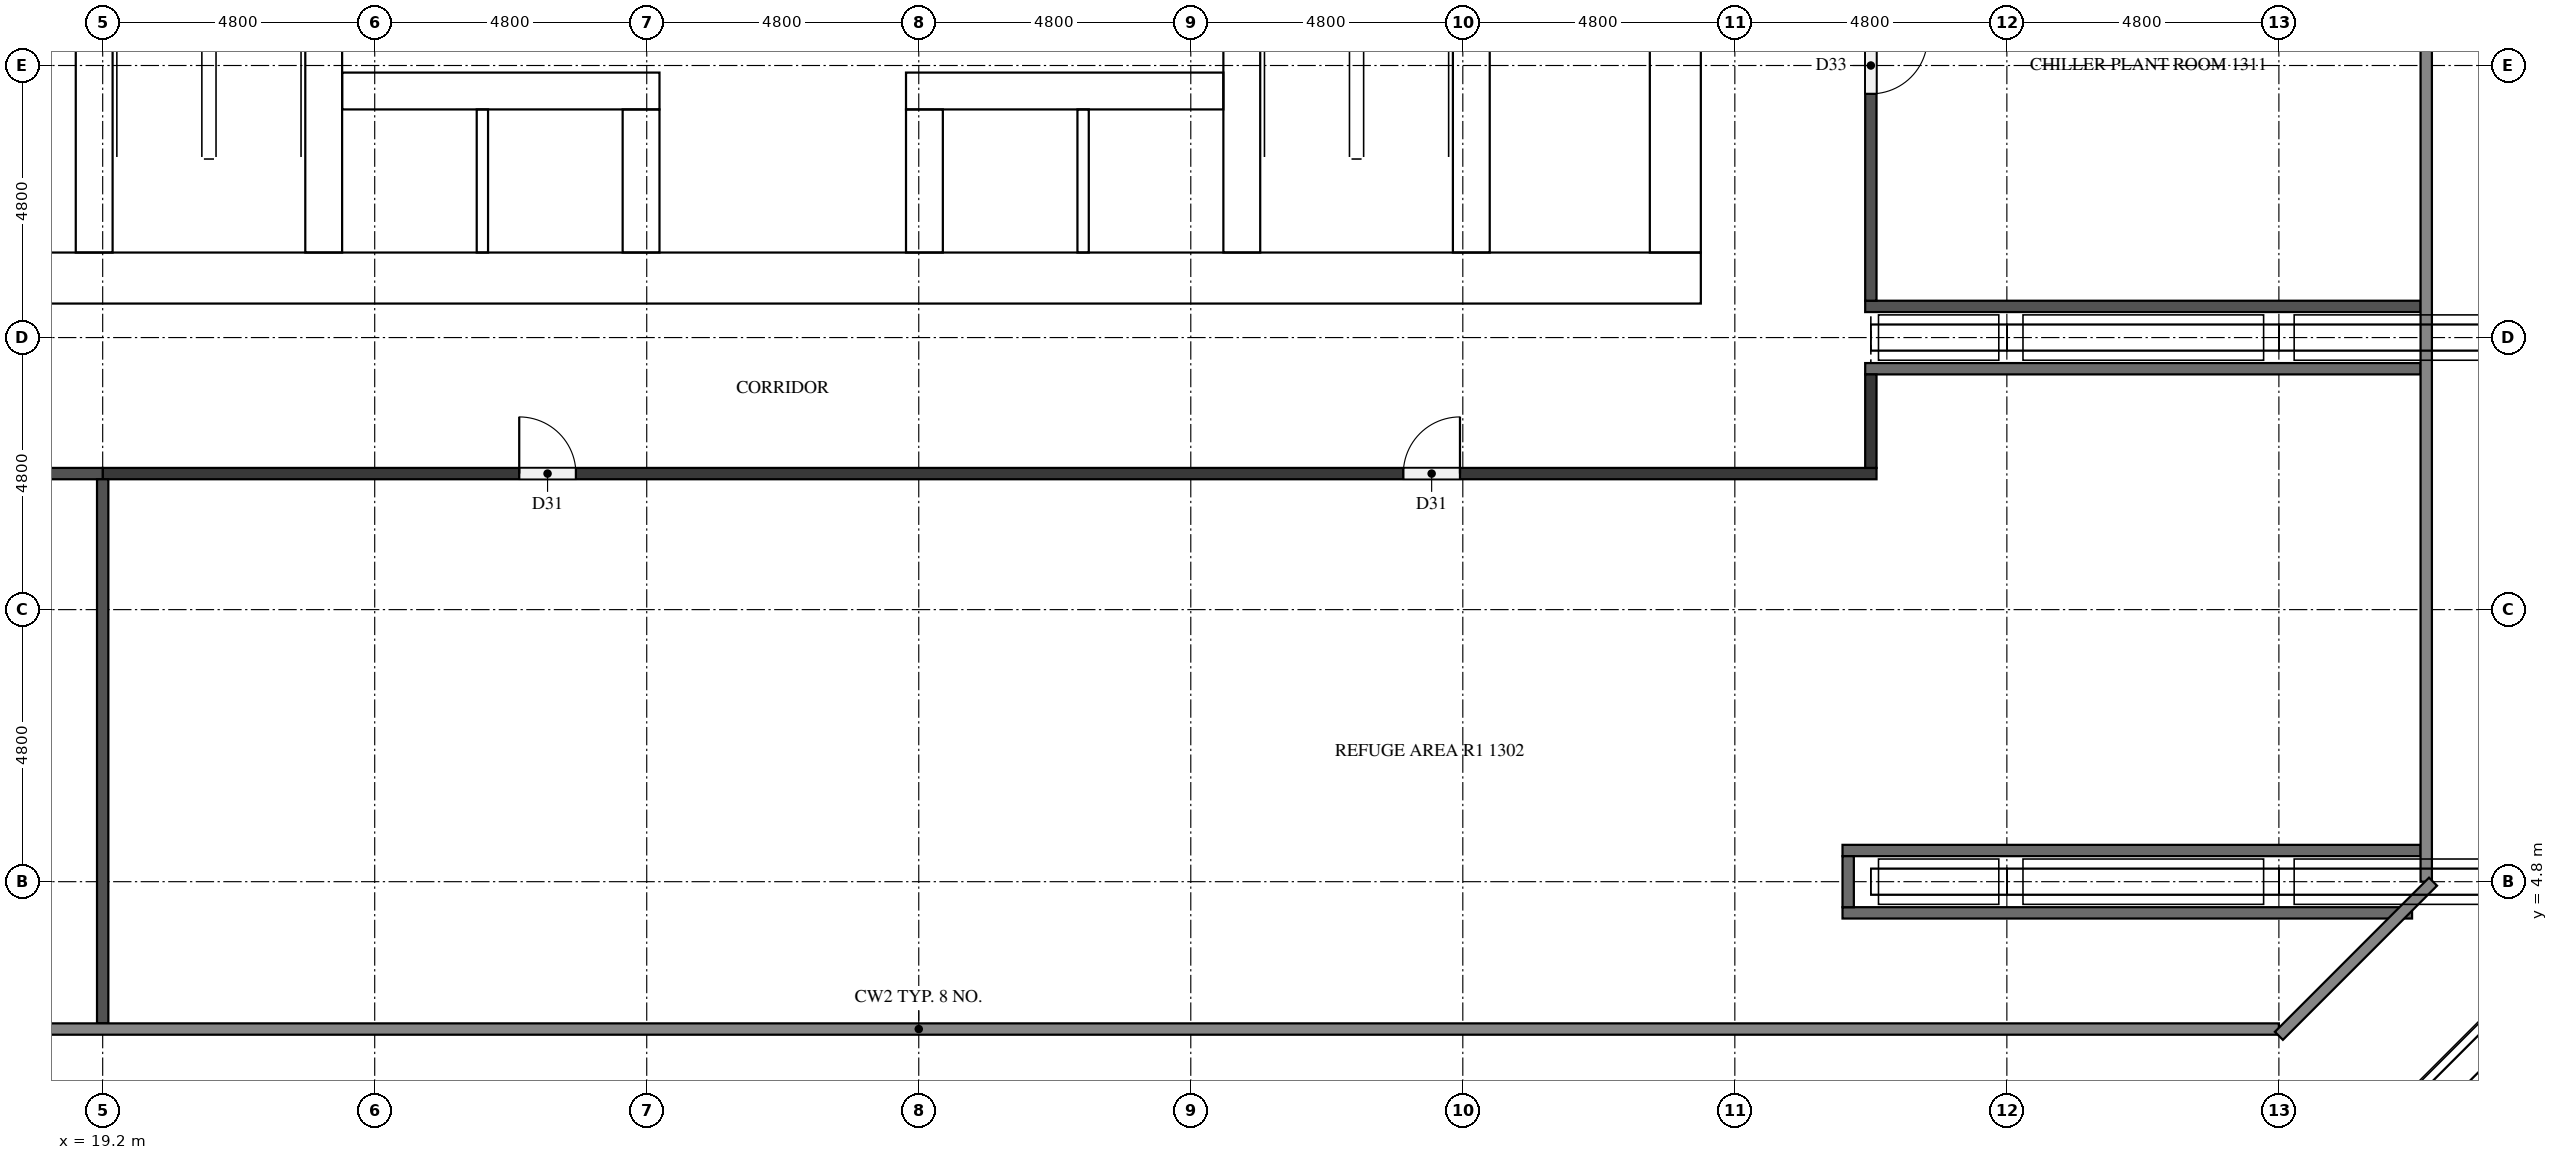
"""IFC4 building model, lengths in metres.
Left out: names, types, materials, properties, quantities, classifications, styles, units other than length and angle.
Written with IfcOpenShell. Run it as: python <this file> out.ifc"""

import sys

from ifc_helpers import new_model, si_unit, direction, frame, frame_2d, origin, place, context, subcontext, project, spatial, rectangle, extrude, element, fill, save


model = new_model("IFC4")
c1 = context("Model", 3, precision=1e-05, world=origin(), true_north=direction((0.0, 1.0)))
c2 = subcontext(c1, "Body", "Model", "MODEL_VIEW")
j1 = project(units=[si_unit("LENGTHUNIT", "METRE"), si_unit("PLANEANGLEUNIT", "RADIAN")], contexts=[c1])
p1 = place(None, origin())
s1 = spatial("IfcSite", under=j1, at=p1, CompositionType="ELEMENT")
p2 = place(p1, origin())
s2 = spatial("IfcBuilding", under=s1, at=p2, CompositionType="ELEMENT")
p3 = place(p2, frame((0.0, 0.0, 53.9)))
s3 = spatial("IfcBuildingStorey", under=s2, at=p3, CompositionType="ELEMENT", Elevation=53.9)
p4 = place(p3, frame((15.0, 15.45, 0.0), z_axis=(0.0, 0.0, 1.0), x_axis=(1.0, 0.0, 0.0)))
e1 = element("IfcWall", 1, at=p4, inside=s3, PredefinedType="SHEAR", context=c2, shape_type="SweptSolid", body=[
    extrude(rectangle(XDim=32.4, YDim=0.9, at=frame_2d((16.2, 0.0))), origin(), (0.0, 0.0, 1.0), 5.1),
])
p5 = place(p4, frame((15.3, 0.0, 0.0)))
e2 = element("IfcOpeningElement", 2, at=p5, cuts=e1, PredefinedType="OPENING", context=c2, shape_type="SweptSolid", body=[
    extrude(rectangle(XDim=1.8, YDim=2.1, at=frame_2d((0.9, 1.05))), frame((0.0, 0.46, 0.0), z_axis=(0.0, -1.0, 0.0), x_axis=(1.0, 0.0, 0.0)), (0.0, 0.0, 1.0), 0.92),
])
p6 = place(p3, frame((46.95, 15.9, 0.0), z_axis=(0.0, 0.0, 1.0), x_axis=(0.0, 1.0, 0.0)))
e3 = element("IfcWall", 3, at=p6, inside=s3, PredefinedType="SHEAR", context=c2, shape_type="SweptSolid", body=[
    extrude(rectangle(XDim=21.0, YDim=0.9, at=frame_2d((10.5, 0.0))), origin(), (0.0, 0.0, 1.0), 5.1),
])
p7 = place(p6, frame((10.2, 0.0, 0.0)))
e4 = element("IfcOpeningElement", 4, at=p7, cuts=e3, PredefinedType="OPENING", context=c2, shape_type="SweptSolid", body=[
    extrude(rectangle(XDim=1.2, YDim=2.1, at=frame_2d((0.6, 1.05))), frame((0.0, 0.46, 0.0), z_axis=(0.0, -1.0, 0.0), x_axis=(1.0, 0.0, 0.0)), (0.0, 0.0, 1.0), 0.92),
])
p8 = place(p3, frame((19.05, 15.9, 0.0), z_axis=(0.0, 0.0, 1.0), x_axis=(0.0, 1.0, 0.0)))
e5 = element("IfcWall", 5, at=p8, inside=s3, PredefinedType="SHEAR", context=c2, shape_type="SweptSolid", body=[
    extrude(rectangle(XDim=15.025, YDim=0.65, at=frame_2d((7.513, 0.0))), origin(), (0.0, 0.0, 1.0), 5.1),
])
p9 = place(p8, frame((9.55, 0.0, 0.0)))
e6 = element("IfcOpeningElement", 6, at=p9, cuts=e5, PredefinedType="OPENING", context=c2, shape_type="SweptSolid", body=[
    extrude(rectangle(XDim=1.1, YDim=2.1, at=frame_2d((0.55, 1.05))), frame((0.0, 0.335, 0.0), z_axis=(0.0, -1.0, 0.0), x_axis=(1.0, 0.0, 0.0)), (0.0, 0.0, 1.0), 0.67),
])
p10 = place(p8, frame((13.05, 0.0, 0.0)))
e7 = element("IfcOpeningElement", 7, at=p10, cuts=e5, PredefinedType="OPENING", context=c2, shape_type="SweptSolid", body=[
    extrude(rectangle(XDim=1.1, YDim=2.1, at=frame_2d((0.55, 1.05))), frame((0.0, 0.335, 0.0), z_axis=(0.0, -1.0, 0.0), x_axis=(1.0, 0.0, 0.0)), (0.0, 0.0, 1.0), 0.67),
])
p11 = place(p8, frame((0.3, 0.0, 0.0)))
e8 = element("IfcOpeningElement", 8, at=p11, cuts=e5, PredefinedType="OPENING", context=c2, shape_type="SweptSolid", body=[
    extrude(rectangle(XDim=1.2, YDim=2.1, at=frame_2d((0.6, 1.05))), frame((0.0, 0.335, 0.0), z_axis=(0.0, -1.0, 0.0), x_axis=(1.0, 0.0, 0.0)), (0.0, 0.0, 1.0), 0.67),
])
p12 = place(p3, frame((23.1, 15.9, 0.0), z_axis=(0.0, 0.0, 1.0), x_axis=(0.0, 1.0, 0.0)))
e9 = element("IfcWall", 9, at=p12, inside=s3, PredefinedType="SHEAR", context=c2, shape_type="SweptSolid", body=[
    extrude(rectangle(XDim=21.0, YDim=0.65, at=frame_2d((10.5, 0.0))), origin(), (0.0, 0.0, 1.0), 5.1),
])
p13 = place(p3, frame((39.3, 15.9, 0.0), z_axis=(0.0, 0.0, 1.0), x_axis=(0.0, 1.0, 0.0)))
e10 = element("IfcWall", 10, at=p13, inside=s3, PredefinedType="SHEAR", context=c2, shape_type="SweptSolid", body=[
    extrude(rectangle(XDim=8.35, YDim=0.65, at=frame_2d((4.175, 0.0))), origin(), (0.0, 0.0, 1.0), 5.1),
])
p14 = place(p3, frame((43.35, 15.9, 0.0), z_axis=(0.0, 0.0, 1.0), x_axis=(0.0, 1.0, 0.0)))
e11 = element("IfcWall", 11, at=p14, inside=s3, PredefinedType="SHEAR", context=c2, shape_type="SweptSolid", body=[
    extrude(rectangle(XDim=8.35, YDim=0.65, at=frame_2d((4.175, 0.0))), origin(), (0.0, 0.0, 1.0), 5.1),
])
p15 = place(p14, frame((0.3, 0.0, 0.0)))
e12 = element("IfcOpeningElement", 12, at=p15, cuts=e11, PredefinedType="OPENING", context=c2, shape_type="SweptSolid", body=[
    extrude(rectangle(XDim=1.2, YDim=2.1, at=frame_2d((0.6, 1.05))), frame((0.0, 0.335, 0.0), z_axis=(0.0, -1.0, 0.0), x_axis=(1.0, 0.0, 0.0)), (0.0, 0.0, 1.0), 0.67),
])
p16 = place(p3, frame((23.425, 18.75, 0.0), z_axis=(0.0, 0.0, 1.0), x_axis=(1.0, 0.0, 0.0)))
e13 = element("IfcWall", 13, at=p16, inside=s3, PredefinedType="SHEAR", context=c2, shape_type="SweptSolid", body=[
    extrude(rectangle(XDim=5.6, YDim=0.65, at=frame_2d((2.8, 0.0))), origin(), (0.0, 0.0, 1.0), 5.1),
])
p17 = place(p16, frame((0.637, 0.0, 0.0)))
e14 = element("IfcOpeningElement", 14, at=p17, cuts=e13, PredefinedType="OPENING", context=c2, shape_type="SweptSolid", body=[
    extrude(rectangle(XDim=1.1, YDim=2.1, at=frame_2d((0.55, 1.05))), frame((0.0, 0.335, 0.0), z_axis=(0.0, -1.0, 0.0), x_axis=(1.0, 0.0, 0.0)), (0.0, 0.0, 1.0), 0.67),
])
p18 = place(p16, frame((3.212, 0.0, 0.0)))
e15 = element("IfcOpeningElement", 15, at=p18, cuts=e13, PredefinedType="OPENING", context=c2, shape_type="SweptSolid", body=[
    extrude(rectangle(XDim=1.1, YDim=2.1, at=frame_2d((0.55, 1.05))), frame((0.0, 0.335, 0.0), z_axis=(0.0, -1.0, 0.0), x_axis=(1.0, 0.0, 0.0)), (0.0, 0.0, 1.0), 0.67),
])
p19 = place(p3, frame((33.375, 18.75, 0.0), z_axis=(0.0, 0.0, 1.0), x_axis=(1.0, 0.0, 0.0)))
e16 = element("IfcWall", 16, at=p19, inside=s3, PredefinedType="SHEAR", context=c2, shape_type="SweptSolid", body=[
    extrude(rectangle(XDim=5.6, YDim=0.65, at=frame_2d((2.8, 0.0))), origin(), (0.0, 0.0, 1.0), 5.1),
])
p20 = place(p19, frame((1.288, 0.0, 0.0)))
e17 = element("IfcOpeningElement", 17, at=p20, cuts=e16, PredefinedType="OPENING", context=c2, shape_type="SweptSolid", body=[
    extrude(rectangle(XDim=1.1, YDim=2.1, at=frame_2d((0.55, 1.05))), frame((0.0, 0.335, 0.0), z_axis=(0.0, -1.0, 0.0), x_axis=(1.0, 0.0, 0.0)), (0.0, 0.0, 1.0), 0.67),
])
p21 = place(p19, frame((3.863, 0.0, 0.0)))
e18 = element("IfcOpeningElement", 18, at=p21, cuts=e16, PredefinedType="OPENING", context=c2, shape_type="SweptSolid", body=[
    extrude(rectangle(XDim=1.1, YDim=2.1, at=frame_2d((0.55, 1.05))), frame((0.0, 0.335, 0.0), z_axis=(0.0, -1.0, 0.0), x_axis=(1.0, 0.0, 0.0)), (0.0, 0.0, 1.0), 0.67),
])
for number, where, z_axis, x_axis in (
    (19, (28.7, 15.9, 0.0), (0.0, 0.0, 1.0), (0.0, 1.0, 0.0)),
    (20, (33.7, 15.9, 0.0), (0.0, 0.0, 1.0), (0.0, 1.0, 0.0)),
):
    element("IfcWall", number, at=place(p3, frame(where, z_axis=z_axis, x_axis=x_axis)), inside=s3, PredefinedType="SHEAR", context=c2, shape_type="SweptSolid", body=[
        extrude(rectangle(XDim=2.525, YDim=0.65, at=frame_2d((1.263, 0.0))), origin(), (0.0, 0.0, 1.0), 5.1),
    ])
for number, where, z_axis, x_axis in (
    (21, (25.9, 15.9, 0.0), (0.0, 0.0, 1.0), (0.0, 1.0, 0.0)),
    (22, (36.5, 15.9, 0.0), (0.0, 0.0, 1.0), (0.0, 1.0, 0.0)),
):
    element("IfcWall", number, at=place(p3, frame(where, z_axis=z_axis, x_axis=x_axis)), inside=s3, PredefinedType="SOLIDWALL", context=c2, shape_type="SweptSolid", body=[
        extrude(rectangle(XDim=2.525, YDim=0.2, at=frame_2d((1.263, 0.0))), origin(), (0.0, 0.0, 1.0), 5.1),
    ])
p22 = place(p3, frame((49.9, 4.25, 0.0), z_axis=(0.0, 0.0, 1.0), x_axis=(1.0, 0.0, 0.0)))
e23 = element("IfcWall", 23, at=p22, inside=s3, PredefinedType="PARTITIONING", context=c2, shape_type="SweptSolid", body=[
    extrude(rectangle(XDim=10.05, YDim=0.2, at=frame_2d((5.025, 0.0))), origin(), (0.0, 0.0, 1.0), 5.1),
])
p23 = place(p3, frame((49.9, 5.35, 0.0), z_axis=(0.0, 0.0, 1.0), x_axis=(1.0, 0.0, 0.0)))
e24 = element("IfcWall", 24, at=p23, inside=s3, PredefinedType="PARTITIONING", context=c2, shape_type="SweptSolid", body=[
    extrude(rectangle(XDim=10.2, YDim=0.2, at=frame_2d((5.1, 0.0))), origin(), (0.0, 0.0, 1.0), 5.1),
])
p24 = place(p3, frame((19.2, 12.0, 0.0), z_axis=(0.0, 0.0, 1.0), x_axis=(1.0, 0.0, 0.0)))
e25 = element("IfcWall", 25, at=p24, inside=s3, PredefinedType="PARTITIONING", context=c2, shape_type="SweptSolid", body=[
    extrude(rectangle(XDim=31.3, YDim=0.2, at=frame_2d((15.65, 0.0))), origin(), (0.0, 0.0, 1.0), 5.1),
])
p25 = place(p24, frame((22.95, 0.0, 0.0)))
e26 = element("IfcOpeningElement", 26, at=p25, cuts=e25, PredefinedType="OPENING", context=c2, shape_type="SweptSolid", body=[
    extrude(rectangle(XDim=1.0, YDim=2.1, at=frame_2d((0.5, 1.05))), frame((0.0, 0.11, 0.0), z_axis=(0.0, -1.0, 0.0), x_axis=(1.0, 0.0, 0.0)), (0.0, 0.0, 1.0), 0.22),
])
p26 = place(p24, frame((7.35, 0.0, 0.0)))
e27 = element("IfcOpeningElement", 27, at=p26, cuts=e25, PredefinedType="OPENING", context=c2, shape_type="SweptSolid", body=[
    extrude(rectangle(XDim=1.0, YDim=2.1, at=frame_2d((0.5, 1.05))), frame((0.0, 0.11, 0.0), z_axis=(0.0, -1.0, 0.0), x_axis=(1.0, 0.0, 0.0)), (0.0, 0.0, 1.0), 0.22),
])
p27 = place(p3, frame((19.2, 12.0, 0.0), z_axis=(0.0, 0.0, 1.0), x_axis=(-1.0, 0.0, 0.0)))
e28 = element("IfcWall", 28, at=p27, inside=s3, PredefinedType="PARTITIONING", context=c2, shape_type="SweptSolid", body=[
    extrude(rectangle(XDim=7.3, YDim=0.2, at=frame_2d((3.65, 0.0))), origin(), (0.0, 0.0, 1.0), 5.1),
])
p28 = place(p27, frame((3.15, 0.0, 0.0)))
e29 = element("IfcOpeningElement", 29, at=p28, cuts=e28, PredefinedType="OPENING", context=c2, shape_type="SweptSolid", body=[
    extrude(rectangle(XDim=1.0, YDim=2.1, at=frame_2d((0.5, 1.05))), frame((0.0, 0.11, 0.0), z_axis=(0.0, -1.0, 0.0), x_axis=(1.0, 0.0, 0.0)), (0.0, 0.0, 1.0), 0.22),
])
for number, where, z_axis, x_axis in (
    (30, (50.3, 13.85, 0.0), (0.0, 0.0, 1.0), (1.0, 0.0, 0.0)),
    (31, (50.3, 14.95, 0.0), (0.0, 0.0, 1.0), (1.0, 0.0, 0.0)),
):
    element("IfcWall", number, at=place(p3, frame(where, z_axis=z_axis, x_axis=x_axis)), inside=s3, PredefinedType="PARTITIONING", context=c2, shape_type="SweptSolid", body=[
        extrude(rectangle(XDim=9.8, YDim=0.2, at=frame_2d((4.9, 0.0))), origin(), (0.0, 0.0, 1.0), 5.1),
    ])
p29 = place(p3, frame((19.2, 2.3, 0.0), z_axis=(0.0, 0.0, 1.0), x_axis=(0.0, 1.0, 0.0)))
e32 = element("IfcWall", 32, at=p29, inside=s3, PredefinedType="PARTITIONING", context=c2, shape_type="SweptSolid", body=[
    extrude(rectangle(XDim=9.6, YDim=0.2, at=frame_2d((4.8, 0.0))), origin(), (0.0, 0.0, 1.0), 5.1),
])
p30 = place(p3, frame((50.0, 4.35, 0.0), z_axis=(0.0, 0.0, 1.0), x_axis=(0.0, 1.0, 0.0)))
e33 = element("IfcWall", 33, at=p30, inside=s3, PredefinedType="PARTITIONING", context=c2, shape_type="SweptSolid", body=[
    extrude(rectangle(XDim=0.9, YDim=0.2, at=frame_2d((0.45, 0.0))), origin(), (0.0, 0.0, 1.0), 5.1),
])
p31 = place(p3, frame((50.4, 12.1, 0.0), z_axis=(0.0, 0.0, 1.0), x_axis=(0.0, 1.0, 0.0)))
e34 = element("IfcWall", 34, at=p31, inside=s3, PredefinedType="PARTITIONING", context=c2, shape_type="SweptSolid", body=[
    extrude(rectangle(XDim=1.65, YDim=0.2, at=frame_2d((0.825, 0.0))), origin(), (0.0, 0.0, 1.0), 5.1),
])
p32 = place(p3, frame((50.4, 23.35, 0.0), z_axis=(0.0, 0.0, 1.0), x_axis=(0.0, -1.0, 0.0)))
e35 = element("IfcWall", 35, at=p32, inside=s3, PredefinedType="PARTITIONING", context=c2, shape_type="SweptSolid", body=[
    extrude(rectangle(XDim=8.3, YDim=0.2, at=frame_2d((4.15, 0.0))), origin(), (0.0, 0.0, 1.0), 5.1),
])
p33 = place(p32, frame((3.65, 0.0, 0.0)))
e36 = element("IfcOpeningElement", 36, at=p33, cuts=e35, PredefinedType="OPENING", context=c2, shape_type="SweptSolid", body=[
    extrude(rectangle(XDim=1.0, YDim=2.1, at=frame_2d((0.5, 1.05))), frame((0.0, 0.11, 0.0), z_axis=(0.0, -1.0, 0.0), x_axis=(1.0, 0.0, 0.0)), (0.0, 0.0, 1.0), 0.22),
])
p34 = place(p17, origin())
e37 = element("IfcDoor", 37, at=p34, inside=s3, OperationType="DOUBLE_DOOR_SLIDING", PredefinedType="DOOR", context=c2, shape_type="SweptSolid", body=[
    extrude(rectangle(XDim=1.1, YDim=2.1, at=frame_2d((0.55, 1.05))), frame((0.0, 0.025, 0.0), z_axis=(0.0, -1.0, 0.0), x_axis=(1.0, 0.0, 0.0)), (0.0, 0.0, 1.0), 0.05),
])
fill(e14, e37)
p35 = place(p18, origin())
e38 = element("IfcDoor", 38, at=p35, inside=s3, OperationType="DOUBLE_DOOR_SLIDING", PredefinedType="DOOR", context=c2, shape_type="SweptSolid", body=[
    extrude(rectangle(XDim=1.1, YDim=2.1, at=frame_2d((0.55, 1.05))), frame((0.0, 0.025, 0.0), z_axis=(0.0, -1.0, 0.0), x_axis=(1.0, 0.0, 0.0)), (0.0, 0.0, 1.0), 0.05),
])
fill(e15, e38)
p36 = place(p20, origin())
e39 = element("IfcDoor", 39, at=p36, inside=s3, OperationType="DOUBLE_DOOR_SLIDING", PredefinedType="DOOR", context=c2, shape_type="SweptSolid", body=[
    extrude(rectangle(XDim=1.1, YDim=2.1, at=frame_2d((0.55, 1.05))), frame((0.0, 0.025, 0.0), z_axis=(0.0, -1.0, 0.0), x_axis=(1.0, 0.0, 0.0)), (0.0, 0.0, 1.0), 0.05),
])
fill(e17, e39)
p37 = place(p21, origin())
e40 = element("IfcDoor", 40, at=p37, inside=s3, OperationType="DOUBLE_DOOR_SLIDING", PredefinedType="DOOR", context=c2, shape_type="SweptSolid", body=[
    extrude(rectangle(XDim=1.1, YDim=2.1, at=frame_2d((0.55, 1.05))), frame((0.0, 0.025, 0.0), z_axis=(0.0, -1.0, 0.0), x_axis=(1.0, 0.0, 0.0)), (0.0, 0.0, 1.0), 0.05),
])
fill(e18, e40)
p38 = place(p11, frame((1.2, 0.0, 0.0), z_axis=(0.0, 0.0, 1.0), x_axis=(-1.0, 0.0, 0.0)))
e41 = element("IfcDoor", 41, at=p38, inside=s3, OperationType="SINGLE_SWING_LEFT", PredefinedType="DOOR", context=c2, shape_type="SweptSolid", body=[
    extrude(rectangle(XDim=1.2, YDim=2.1, at=frame_2d((0.6, 1.05))), frame((0.0, 0.025, 0.0), z_axis=(0.0, -1.0, 0.0), x_axis=(1.0, 0.0, 0.0)), (0.0, 0.0, 1.0), 0.05),
])
fill(e8, e41)
p39 = place(p15, origin())
e42 = element("IfcDoor", 42, at=p39, inside=s3, OperationType="SINGLE_SWING_RIGHT", PredefinedType="DOOR", context=c2, shape_type="SweptSolid", body=[
    extrude(rectangle(XDim=1.2, YDim=2.1, at=frame_2d((0.6, 1.05))), frame((0.0, 0.025, 0.0), z_axis=(0.0, -1.0, 0.0), x_axis=(1.0, 0.0, 0.0)), (0.0, 0.0, 1.0), 0.05),
])
fill(e12, e42)
p40 = place(p5, frame((1.8, 0.0, 0.0), z_axis=(0.0, 0.0, 1.0), x_axis=(-1.0, 0.0, 0.0)))
e43 = element("IfcDoor", 43, at=p40, inside=s3, OperationType="DOUBLE_DOOR_SINGLE_SWING", PredefinedType="DOOR", context=c2, shape_type="SweptSolid", body=[
    extrude(rectangle(XDim=1.8, YDim=2.1, at=frame_2d((0.9, 1.05))), frame((0.0, 0.025, 0.0), z_axis=(0.0, -1.0, 0.0), x_axis=(1.0, 0.0, 0.0)), (0.0, 0.0, 1.0), 0.05),
])
fill(e2, e43)
p41 = place(p25, origin())
e44 = element("IfcDoor", 44, at=p41, inside=s3, OperationType="SINGLE_SWING_RIGHT", PredefinedType="DOOR", context=c2, shape_type="SweptSolid", body=[
    extrude(rectangle(XDim=1.0, YDim=2.1, at=frame_2d((0.5, 1.05))), frame((0.0, 0.025, 0.0), z_axis=(0.0, -1.0, 0.0), x_axis=(1.0, 0.0, 0.0)), (0.0, 0.0, 1.0), 0.05),
])
fill(e26, e44)
p42 = place(p26, origin())
e45 = element("IfcDoor", 45, at=p42, inside=s3, OperationType="SINGLE_SWING_LEFT", PredefinedType="DOOR", context=c2, shape_type="SweptSolid", body=[
    extrude(rectangle(XDim=1.0, YDim=2.1, at=frame_2d((0.5, 1.05))), frame((0.0, 0.025, 0.0), z_axis=(0.0, -1.0, 0.0), x_axis=(1.0, 0.0, 0.0)), (0.0, 0.0, 1.0), 0.05),
])
fill(e27, e45)
p43 = place(p33, origin())
e46 = element("IfcDoor", 46, at=p43, inside=s3, OperationType="SINGLE_SWING_LEFT", PredefinedType="DOOR", context=c2, shape_type="SweptSolid", body=[
    extrude(rectangle(XDim=1.0, YDim=2.1, at=frame_2d((0.5, 1.05))), frame((0.0, 0.025, 0.0), z_axis=(0.0, -1.0, 0.0), x_axis=(1.0, 0.0, 0.0)), (0.0, 0.0, 1.0), 0.05),
])
fill(e36, e46)
save(model, sys.argv[1])
